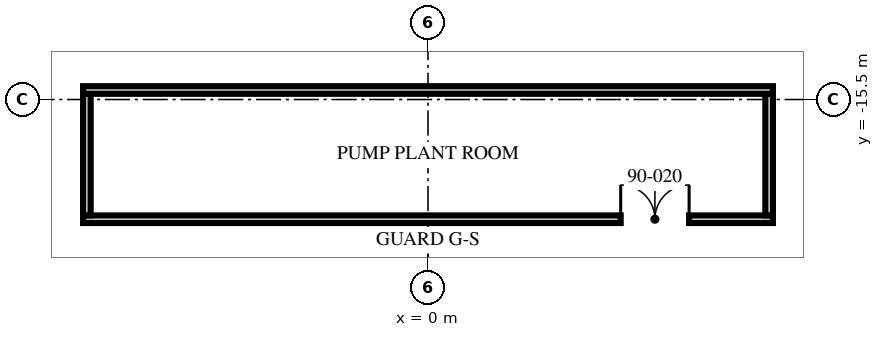
"""IFC4 building model, lengths in metres.
Left out: names, types, materials, properties, quantities, classifications, styles, units other than length and angle.
Written with IfcOpenShell. Run it as: python <this file> out.ifc"""

import sys

from ifc_helpers import new_model, si_unit, direction, frame, frame_2d, origin, place, context, subcontext, project, spatial, rectangle, extrude, element, fill, save


model = new_model("IFC4")
c1 = context("Model", 3, precision=1e-05, world=origin(), true_north=direction((0.0, 1.0)))
c2 = subcontext(c1, "Body", "Model", "MODEL_VIEW")
j1 = project(units=[si_unit("LENGTHUNIT", "METRE"), si_unit("PLANEANGLEUNIT", "RADIAN")], contexts=[c1])
p1 = place(None, origin())
s1 = spatial("IfcSite", under=j1, at=p1, CompositionType="ELEMENT")
p2 = place(p1, origin())
s2 = spatial("IfcBuilding", under=s1, at=p2, CompositionType="ELEMENT")
p3 = place(p2, frame((0.0, 0.0, 358.25)))
s3 = spatial("IfcBuildingStorey", under=s2, at=p3, CompositionType="ELEMENT", Elevation=358.25)
p4 = place(p3, frame((-9.076, -18.65, 0.0), z_axis=(0.0, 0.0, 1.0), x_axis=(1.0, 0.0, 0.0)))
e1 = element("IfcWall", 1, at=p4, inside=s3, PredefinedType="SOLIDWALL", context=c2, shape_type="SweptSolid", body=[
    extrude(rectangle(XDim=18.152, YDim=0.2, at=frame_2d((9.076, 0.0))), origin(), (0.0, 0.0, 1.0), 4.0),
])
p5 = place(p4, frame((14.146, 0.0, 0.0)))
e2 = element("IfcOpeningElement", 2, at=p5, cuts=e1, PredefinedType="OPENING", context=c2, shape_type="SweptSolid", body=[
    extrude(rectangle(XDim=1.8, YDim=2.4, at=frame_2d((0.9, 1.2))), frame((0.0, 0.11, 0.0), z_axis=(0.0, -1.0, 0.0), x_axis=(1.0, 0.0, 0.0)), (0.0, 0.0, 1.0), 0.22),
])
for number, where, z_axis, x_axis in (
    (3, (-8.976, -18.55, 0.0), (0.0, 0.0, 1.0), (0.0, 1.0, 0.0)),
    (4, (8.976, -18.55, 0.0), (0.0, 0.0, 1.0), (0.0, 1.0, 0.0)),
):
    element("IfcWall", number, at=place(p3, frame(where, z_axis=z_axis, x_axis=x_axis)), inside=s3, PredefinedType="SOLIDWALL", context=c2, shape_type="SweptSolid", body=[
        extrude(rectangle(XDim=3.2, YDim=0.2, at=frame_2d((1.6, 0.0))), origin(), (0.0, 0.0, 1.0), 4.65),
    ])
p6 = place(p3, frame((-9.076, -15.25, 0.0), z_axis=(0.0, 0.0, 1.0), x_axis=(1.0, 0.0, 0.0)))
e5 = element("IfcWall", 5, at=p6, inside=s3, PredefinedType="SOLIDWALL", context=c2, shape_type="SweptSolid", body=[
    extrude(rectangle(XDim=18.152, YDim=0.2, at=frame_2d((9.076, 0.0))), origin(), (0.0, 0.0, 1.0), 4.0),
])
p7 = place(p5, origin())
e6 = element("IfcDoor", 6, at=p7, inside=s3, OperationType="DOUBLE_DOOR_SINGLE_SWING", PredefinedType="DOOR", context=c2, shape_type="SweptSolid", body=[
    extrude(rectangle(XDim=1.8, YDim=2.4, at=frame_2d((0.9, 1.2))), frame((0.0, 0.025, 0.0), z_axis=(0.0, -1.0, 0.0), x_axis=(1.0, 0.0, 0.0)), (0.0, 0.0, 1.0), 0.05),
])
fill(e2, e6)
save(model, sys.argv[1])
